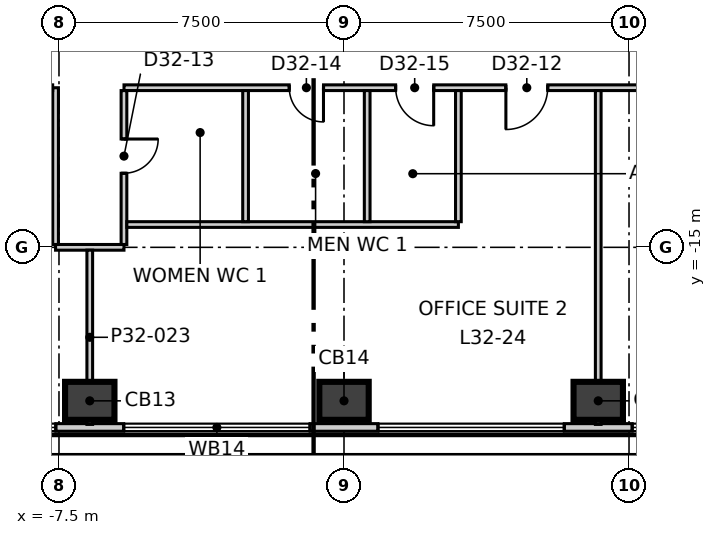
"""IFC4 building model, lengths in metres.
Left out: names, types, materials, properties, quantities, classifications, styles, units other than length and angle.
Written with IfcOpenShell. Run it as: python <this file> out.ifc"""

import sys

from ifc_helpers import new_model, si_unit, direction, frame, frame_2d, origin, origin_2d, place, context, subcontext, project, spatial, rectangle, extrude, element, fill, save


model = new_model("IFC4")
c1 = context("Model", 3, precision=1e-05, world=origin(), true_north=direction((0.0, 1.0)))
c2 = subcontext(c1, "Body", "Model", "MODEL_VIEW")
j1 = project(units=[si_unit("LENGTHUNIT", "METRE"), si_unit("PLANEANGLEUNIT", "RADIAN")], contexts=[c1])
p1 = place(None, origin())
s1 = spatial("IfcSite", under=j1, at=p1, CompositionType="ELEMENT")
p2 = place(p1, origin())
s2 = spatial("IfcBuilding", under=s1, at=p2, CompositionType="ELEMENT")
p3 = place(p2, frame((0.0, 0.0, 140.3)))
s3 = spatial("IfcBuildingStorey", under=s2, at=p3, CompositionType="ELEMENT", Elevation=140.3)
for number, where, z_axis, x_axis in (
    (1, (-6.69, -19.039, -0.3), (0.0, 0.0, 1.0), (1.0, 0.0, 0.0)),
    (2, (0.0, -19.039, -0.3), (0.0, 0.0, 1.0), (1.0, 0.0, 0.0)),
    (3, (6.69, -19.039, -0.3), (0.0, 0.0, 1.0), (1.0, 0.0, 0.0)),
):
    element("IfcColumn", number, at=place(p3, frame(where, z_axis=z_axis, x_axis=x_axis)), inside=s3, PredefinedType="COLUMN", context=c2, shape_type="SweptSolid", body=[
        extrude(rectangle(XDim=1.3, YDim=1.0, at=origin_2d()), origin(), (0.0, 0.0, 1.0), 4.0),
    ])
p4 = place(p3, frame((-3.063, 34.172, 0.0), z_axis=(0.0, 0.0, 1.0), x_axis=(-0.500008098571, -0.866020728022, 0.0)))
e4 = element("IfcWall", 4, at=p4, inside=s3, PredefinedType="ELEMENTEDWALL", context=c2, shape_type="SweptSolid", body=[
    extrude(rectangle(XDim=56.105, YDim=0.2, at=frame_2d((28.052, 0.0))), origin(), (0.0, 0.0, 1.0), 3.7),
])
p5 = place(p4, frame((2.197, 0.0, 0.9)))
e5 = element("IfcOpeningElement", 5, at=p5, cuts=e4, PredefinedType="OPENING", context=c2, shape_type="SweptSolid", body=[
    extrude(rectangle(XDim=4.9, YDim=2.5, at=frame_2d((2.45, 1.25))), frame((0.0, 0.11, 0.0), z_axis=(0.0, -1.0, 0.0), x_axis=(1.0, 0.0, 0.0)), (0.0, 0.0, 1.0), 0.22),
])
p6 = place(p4, frame((8.887, 0.0, 0.9)))
e6 = element("IfcOpeningElement", 6, at=p6, cuts=e4, PredefinedType="OPENING", context=c2, shape_type="SweptSolid", body=[
    extrude(rectangle(XDim=4.9, YDim=2.5, at=frame_2d((2.45, 1.25))), frame((0.0, 0.11, 0.0), z_axis=(0.0, -1.0, 0.0), x_axis=(1.0, 0.0, 0.0)), (0.0, 0.0, 1.0), 0.22),
])
p7 = place(p4, frame((15.577, 0.0, 0.9)))
e7 = element("IfcOpeningElement", 7, at=p7, cuts=e4, PredefinedType="OPENING", context=c2, shape_type="SweptSolid", body=[
    extrude(rectangle(XDim=4.9, YDim=2.5, at=frame_2d((2.45, 1.25))), frame((0.0, 0.11, 0.0), z_axis=(0.0, -1.0, 0.0), x_axis=(1.0, 0.0, 0.0)), (0.0, 0.0, 1.0), 0.22),
])
p8 = place(p4, frame((22.267, 0.0, 0.9)))
e8 = element("IfcOpeningElement", 8, at=p8, cuts=e4, PredefinedType="OPENING", context=c2, shape_type="SweptSolid", body=[
    extrude(rectangle(XDim=4.9, YDim=2.5, at=frame_2d((2.45, 1.25))), frame((0.0, 0.11, 0.0), z_axis=(0.0, -1.0, 0.0), x_axis=(1.0, 0.0, 0.0)), (0.0, 0.0, 1.0), 0.22),
])
p9 = place(p4, frame((28.957, 0.0, 0.9)))
e9 = element("IfcOpeningElement", 9, at=p9, cuts=e4, PredefinedType="OPENING", context=c2, shape_type="SweptSolid", body=[
    extrude(rectangle(XDim=4.9, YDim=2.5, at=frame_2d((2.45, 1.25))), frame((0.0, 0.11, 0.0), z_axis=(0.0, -1.0, 0.0), x_axis=(1.0, 0.0, 0.0)), (0.0, 0.0, 1.0), 0.22),
])
p10 = place(p4, frame((35.647, 0.0, 0.9)))
e10 = element("IfcOpeningElement", 10, at=p10, cuts=e4, PredefinedType="OPENING", context=c2, shape_type="SweptSolid", body=[
    extrude(rectangle(XDim=4.9, YDim=2.5, at=frame_2d((2.45, 1.25))), frame((0.0, 0.11, 0.0), z_axis=(0.0, -1.0, 0.0), x_axis=(1.0, 0.0, 0.0)), (0.0, 0.0, 1.0), 0.22),
])
p11 = place(p4, frame((42.337, 0.0, 0.9)))
e11 = element("IfcOpeningElement", 11, at=p11, cuts=e4, PredefinedType="OPENING", context=c2, shape_type="SweptSolid", body=[
    extrude(rectangle(XDim=4.9, YDim=2.5, at=frame_2d((2.45, 1.25))), frame((0.0, 0.11, 0.0), z_axis=(0.0, -1.0, 0.0), x_axis=(1.0, 0.0, 0.0)), (0.0, 0.0, 1.0), 0.22),
])
p12 = place(p4, frame((49.027, 0.0, 0.9)))
e12 = element("IfcOpeningElement", 12, at=p12, cuts=e4, PredefinedType="OPENING", context=c2, shape_type="SweptSolid", body=[
    extrude(rectangle(XDim=4.9, YDim=2.5, at=frame_2d((2.45, 1.25))), frame((0.0, 0.11, 0.0), z_axis=(0.0, -1.0, 0.0), x_axis=(1.0, 0.0, 0.0)), (0.0, 0.0, 1.0), 0.22),
])
p13 = place(p3, frame((-28.063, -19.739, 0.0), z_axis=(0.0, 0.0, 1.0), x_axis=(1.0, 0.0, 0.0)))
e13 = element("IfcWall", 13, at=p13, inside=s3, PredefinedType="ELEMENTEDWALL", context=c2, shape_type="SweptSolid", body=[
    extrude(rectangle(XDim=56.106, YDim=0.2, at=frame_2d((28.053, 0.0))), origin(), (0.0, 0.0, 1.0), 3.7),
])
p14 = place(p13, frame((2.198, 0.0, 0.9)))
e14 = element("IfcOpeningElement", 14, at=p14, cuts=e13, PredefinedType="OPENING", context=c2, shape_type="SweptSolid", body=[
    extrude(rectangle(XDim=4.9, YDim=2.5, at=frame_2d((2.45, 1.25))), frame((0.0, 0.11, 0.0), z_axis=(0.0, -1.0, 0.0), x_axis=(1.0, 0.0, 0.0)), (0.0, 0.0, 1.0), 0.22),
])
p15 = place(p13, frame((8.888, 0.0, 0.9)))
e15 = element("IfcOpeningElement", 15, at=p15, cuts=e13, PredefinedType="OPENING", context=c2, shape_type="SweptSolid", body=[
    extrude(rectangle(XDim=4.9, YDim=2.5, at=frame_2d((2.45, 1.25))), frame((0.0, 0.11, 0.0), z_axis=(0.0, -1.0, 0.0), x_axis=(1.0, 0.0, 0.0)), (0.0, 0.0, 1.0), 0.22),
])
p16 = place(p13, frame((15.578, 0.0, 0.9)))
e16 = element("IfcOpeningElement", 16, at=p16, cuts=e13, PredefinedType="OPENING", context=c2, shape_type="SweptSolid", body=[
    extrude(rectangle(XDim=4.9, YDim=2.5, at=frame_2d((2.45, 1.25))), frame((0.0, 0.11, 0.0), z_axis=(0.0, -1.0, 0.0), x_axis=(1.0, 0.0, 0.0)), (0.0, 0.0, 1.0), 0.22),
])
p17 = place(p13, frame((22.268, 0.0, 0.9)))
e17 = element("IfcOpeningElement", 17, at=p17, cuts=e13, PredefinedType="OPENING", context=c2, shape_type="SweptSolid", body=[
    extrude(rectangle(XDim=4.9, YDim=2.5, at=frame_2d((2.45, 1.25))), frame((0.0, 0.11, 0.0), z_axis=(0.0, -1.0, 0.0), x_axis=(1.0, 0.0, 0.0)), (0.0, 0.0, 1.0), 0.22),
])
p18 = place(p13, frame((28.958, 0.0, 0.9)))
e18 = element("IfcOpeningElement", 18, at=p18, cuts=e13, PredefinedType="OPENING", context=c2, shape_type="SweptSolid", body=[
    extrude(rectangle(XDim=4.9, YDim=2.5, at=frame_2d((2.45, 1.25))), frame((0.0, 0.11, 0.0), z_axis=(0.0, -1.0, 0.0), x_axis=(1.0, 0.0, 0.0)), (0.0, 0.0, 1.0), 0.22),
])
p19 = place(p13, frame((35.648, 0.0, 0.9)))
e19 = element("IfcOpeningElement", 19, at=p19, cuts=e13, PredefinedType="OPENING", context=c2, shape_type="SweptSolid", body=[
    extrude(rectangle(XDim=4.9, YDim=2.5, at=frame_2d((2.45, 1.25))), frame((0.0, 0.11, 0.0), z_axis=(0.0, -1.0, 0.0), x_axis=(1.0, 0.0, 0.0)), (0.0, 0.0, 1.0), 0.22),
])
p20 = place(p13, frame((42.338, 0.0, 0.9)))
e20 = element("IfcOpeningElement", 20, at=p20, cuts=e13, PredefinedType="OPENING", context=c2, shape_type="SweptSolid", body=[
    extrude(rectangle(XDim=4.9, YDim=2.5, at=frame_2d((2.45, 1.25))), frame((0.0, 0.11, 0.0), z_axis=(0.0, -1.0, 0.0), x_axis=(1.0, 0.0, 0.0)), (0.0, 0.0, 1.0), 0.22),
])
p21 = place(p13, frame((49.028, 0.0, 0.9)))
e21 = element("IfcOpeningElement", 21, at=p21, cuts=e13, PredefinedType="OPENING", context=c2, shape_type="SweptSolid", body=[
    extrude(rectangle(XDim=4.9, YDim=2.5, at=frame_2d((2.45, 1.25))), frame((0.0, 0.11, 0.0), z_axis=(0.0, -1.0, 0.0), x_axis=(1.0, 0.0, 0.0)), (0.0, 0.0, 1.0), 0.22),
])
p22 = place(p3, frame((31.126, -14.433, 0.0), z_axis=(0.0, 0.0, 1.0), x_axis=(-0.500008098571, 0.866020728022, 0.0)))
e22 = element("IfcWall", 22, at=p22, inside=s3, PredefinedType="ELEMENTEDWALL", context=c2, shape_type="SweptSolid", body=[
    extrude(rectangle(XDim=56.105, YDim=0.2, at=frame_2d((28.052, 0.0))), origin(), (0.0, 0.0, 1.0), 3.7),
])
p23 = place(p22, frame((2.198, 0.0, 0.9)))
e23 = element("IfcOpeningElement", 23, at=p23, cuts=e22, PredefinedType="OPENING", context=c2, shape_type="SweptSolid", body=[
    extrude(rectangle(XDim=4.9, YDim=2.5, at=frame_2d((2.45, 1.25))), frame((0.0, 0.11, 0.0), z_axis=(0.0, -1.0, 0.0), x_axis=(1.0, 0.0, 0.0)), (0.0, 0.0, 1.0), 0.22),
])
p24 = place(p22, frame((8.888, 0.0, 0.9)))
e24 = element("IfcOpeningElement", 24, at=p24, cuts=e22, PredefinedType="OPENING", context=c2, shape_type="SweptSolid", body=[
    extrude(rectangle(XDim=4.9, YDim=2.5, at=frame_2d((2.45, 1.25))), frame((0.0, 0.11, 0.0), z_axis=(0.0, -1.0, 0.0), x_axis=(1.0, 0.0, 0.0)), (0.0, 0.0, 1.0), 0.22),
])
p25 = place(p22, frame((15.578, 0.0, 0.9)))
e25 = element("IfcOpeningElement", 25, at=p25, cuts=e22, PredefinedType="OPENING", context=c2, shape_type="SweptSolid", body=[
    extrude(rectangle(XDim=4.9, YDim=2.5, at=frame_2d((2.45, 1.25))), frame((0.0, 0.11, 0.0), z_axis=(0.0, -1.0, 0.0), x_axis=(1.0, 0.0, 0.0)), (0.0, 0.0, 1.0), 0.22),
])
p26 = place(p22, frame((22.267, 0.0, 0.9)))
e26 = element("IfcOpeningElement", 26, at=p26, cuts=e22, PredefinedType="OPENING", context=c2, shape_type="SweptSolid", body=[
    extrude(rectangle(XDim=4.9, YDim=2.5, at=frame_2d((2.45, 1.25))), frame((0.0, 0.11, 0.0), z_axis=(0.0, -1.0, 0.0), x_axis=(1.0, 0.0, 0.0)), (0.0, 0.0, 1.0), 0.22),
])
p27 = place(p22, frame((28.957, 0.0, 0.9)))
e27 = element("IfcOpeningElement", 27, at=p27, cuts=e22, PredefinedType="OPENING", context=c2, shape_type="SweptSolid", body=[
    extrude(rectangle(XDim=4.9, YDim=2.5, at=frame_2d((2.45, 1.25))), frame((0.0, 0.11, 0.0), z_axis=(0.0, -1.0, 0.0), x_axis=(1.0, 0.0, 0.0)), (0.0, 0.0, 1.0), 0.22),
])
p28 = place(p22, frame((35.647, 0.0, 0.9)))
e28 = element("IfcOpeningElement", 28, at=p28, cuts=e22, PredefinedType="OPENING", context=c2, shape_type="SweptSolid", body=[
    extrude(rectangle(XDim=4.9, YDim=2.5, at=frame_2d((2.45, 1.25))), frame((0.0, 0.11, 0.0), z_axis=(0.0, -1.0, 0.0), x_axis=(1.0, 0.0, 0.0)), (0.0, 0.0, 1.0), 0.22),
])
p29 = place(p22, frame((42.337, 0.0, 0.9)))
e29 = element("IfcOpeningElement", 29, at=p29, cuts=e22, PredefinedType="OPENING", context=c2, shape_type="SweptSolid", body=[
    extrude(rectangle(XDim=4.9, YDim=2.5, at=frame_2d((2.45, 1.25))), frame((0.0, 0.11, 0.0), z_axis=(0.0, -1.0, 0.0), x_axis=(1.0, 0.0, 0.0)), (0.0, 0.0, 1.0), 0.22),
])
p30 = place(p22, frame((49.027, 0.0, 0.9)))
e30 = element("IfcOpeningElement", 30, at=p30, cuts=e22, PredefinedType="OPENING", context=c2, shape_type="SweptSolid", body=[
    extrude(rectangle(XDim=4.9, YDim=2.5, at=frame_2d((2.45, 1.25))), frame((0.0, 0.11, 0.0), z_axis=(0.0, -1.0, 0.0), x_axis=(1.0, 0.0, 0.0)), (0.0, 0.0, 1.0), 0.22),
])
p31 = place(p3, frame((-7.59, -15.0, 0.0), z_axis=(0.0, 0.0, 1.0), x_axis=(1.0, 0.0, 0.0)))
e31 = element("IfcWall", 31, at=p31, inside=s3, PredefinedType="PARTITIONING", context=c2, shape_type="SweptSolid", body=[
    extrude(rectangle(XDim=1.8, YDim=0.15, at=frame_2d((0.9, 0.0))), origin(), (0.0, 0.0, 1.0), 3.7),
])
p32 = place(p3, frame((-7.59, -14.925, 0.0), z_axis=(0.0, 0.0, 1.0), x_axis=(0.0, 1.0, 0.0)))
e32 = element("IfcWall", 32, at=p32, inside=s3, PredefinedType="PARTITIONING", context=c2, shape_type="SweptSolid", body=[
    extrude(rectangle(XDim=4.124, YDim=0.15, at=frame_2d((2.062, 0.0))), origin(), (0.0, 0.0, 1.0), 3.7),
])
p33 = place(p3, frame((-18.556, -10.8, 0.0), z_axis=(0.0, 0.0, 1.0), x_axis=(1.0, 0.0, 0.0)))
e33 = element("IfcWall", 33, at=p33, inside=s3, PredefinedType="PARTITIONING", context=c2, shape_type="SweptSolid", body=[
    extrude(rectangle(XDim=10.89, YDim=0.15, at=frame_2d((5.445, 0.0))), origin(), (0.0, 0.0, 1.0), 3.7),
])
p34 = place(p33, frame((4.9, 0.0, 0.0)))
e34 = element("IfcOpeningElement", 34, at=p34, cuts=e33, PredefinedType="OPENING", context=c2, shape_type="SweptSolid", body=[
    extrude(rectangle(XDim=1.1, YDim=2.1, at=frame_2d((0.55, 1.05))), frame((0.0, 0.085, 0.0), z_axis=(0.0, -1.0, 0.0), x_axis=(1.0, 0.0, 0.0)), (0.0, 0.0, 1.0), 0.17),
])
p35 = place(p3, frame((-5.789, -10.8, 0.0), z_axis=(0.0, 0.0, 1.0), x_axis=(1.0, 0.0, 0.0)))
e35 = element("IfcWall", 35, at=p35, inside=s3, PredefinedType="PARTITIONING", context=c2, shape_type="SweptSolid", body=[
    extrude(rectangle(XDim=24.495, YDim=0.15, at=frame_2d((12.248, 0.0))), origin(), (0.0, 0.0, 1.0), 3.7),
])
p36 = place(p35, frame((10.049, 0.0, 0.0)))
e36 = element("IfcOpeningElement", 36, at=p36, cuts=e35, PredefinedType="OPENING", context=c2, shape_type="SweptSolid", body=[
    extrude(rectangle(XDim=1.1, YDim=2.1, at=frame_2d((0.55, 1.05))), frame((0.0, 0.085, 0.0), z_axis=(0.0, -1.0, 0.0), x_axis=(1.0, 0.0, 0.0)), (0.0, 0.0, 1.0), 0.17),
])
p37 = place(p35, frame((4.349, 0.0, 0.0)))
e37 = element("IfcOpeningElement", 37, at=p37, cuts=e35, PredefinedType="OPENING", context=c2, shape_type="SweptSolid", body=[
    extrude(rectangle(XDim=0.9, YDim=2.1, at=frame_2d((0.45, 1.05))), frame((0.0, 0.085, 0.0), z_axis=(0.0, -1.0, 0.0), x_axis=(1.0, 0.0, 0.0)), (0.0, 0.0, 1.0), 0.17),
])
p38 = place(p35, frame((7.149, 0.0, 0.0)))
e38 = element("IfcOpeningElement", 38, at=p38, cuts=e35, PredefinedType="OPENING", context=c2, shape_type="SweptSolid", body=[
    extrude(rectangle(XDim=1.0, YDim=2.1, at=frame_2d((0.5, 1.05))), frame((0.0, 0.085, 0.0), z_axis=(0.0, -1.0, 0.0), x_axis=(1.0, 0.0, 0.0)), (0.0, 0.0, 1.0), 0.17),
])
p39 = place(p35, frame((17.929, 0.0, 0.0)))
e39 = element("IfcOpeningElement", 39, at=p39, cuts=e35, PredefinedType="OPENING", context=c2, shape_type="SweptSolid", body=[
    extrude(rectangle(XDim=1.1, YDim=2.1, at=frame_2d((0.55, 1.05))), frame((0.0, 0.085, 0.0), z_axis=(0.0, -1.0, 0.0), x_axis=(1.0, 0.0, 0.0)), (0.0, 0.0, 1.0), 0.17),
])
p40 = place(p3, frame((-6.69, -19.659, 0.0), z_axis=(0.0, 0.0, 1.0), x_axis=(0.0, 1.0, 0.0)))
e40 = element("IfcWall", 40, at=p40, inside=s3, PredefinedType="PARTITIONING", context=c2, shape_type="SweptSolid", body=[
    extrude(rectangle(XDim=4.584, YDim=0.15, at=frame_2d((2.292, 0.0))), origin(), (0.0, 0.0, 1.0), 3.7),
])
p41 = place(p3, frame((-5.79, -14.925, 0.0), z_axis=(0.0, 0.0, 1.0), x_axis=(0.0, 1.0, 0.0)))
e41 = element("IfcWall", 41, at=p41, inside=s3, PredefinedType="PARTITIONING", context=c2, shape_type="SweptSolid", body=[
    extrude(rectangle(XDim=4.049, YDim=0.15, at=frame_2d((2.024, 0.0))), origin(), (0.0, 0.0, 1.0), 3.7),
])
p42 = place(p41, frame((1.875, 0.0, 0.0)))
e42 = element("IfcOpeningElement", 42, at=p42, cuts=e41, PredefinedType="OPENING", context=c2, shape_type="SweptSolid", body=[
    extrude(rectangle(XDim=0.9, YDim=2.1, at=frame_2d((0.45, 1.05))), frame((0.0, 0.085, 0.0), z_axis=(0.0, -1.0, 0.0), x_axis=(1.0, 0.0, 0.0)), (0.0, 0.0, 1.0), 0.17),
])
p43 = place(p3, frame((-5.715, -14.4, 0.0), z_axis=(0.0, 0.0, 1.0), x_axis=(1.0, 0.0, 0.0)))
e43 = element("IfcWall", 43, at=p43, inside=s3, PredefinedType="PARTITIONING", context=c2, shape_type="SweptSolid", body=[
    extrude(rectangle(XDim=8.725, YDim=0.15, at=frame_2d((4.363, 0.0))), origin(), (0.0, 0.0, 1.0), 3.7),
])
for number, where, z_axis, x_axis in (
    (44, (-2.59, -14.325, 0.0), (0.0, 0.0, 1.0), (0.0, 1.0, 0.0)),
    (45, (3.01, -14.325, 0.0), (0.0, 0.0, 1.0), (0.0, 1.0, 0.0)),
    (46, (0.61, -14.325, 0.0), (0.0, 0.0, 1.0), (0.0, 1.0, 0.0)),
):
    element("IfcWall", number, at=place(p3, frame(where, z_axis=z_axis, x_axis=x_axis)), inside=s3, PredefinedType="PARTITIONING", context=c2, shape_type="SweptSolid", body=[
        extrude(rectangle(XDim=3.45, YDim=0.15, at=frame_2d((1.725, 0.0))), origin(), (0.0, 0.0, 1.0), 3.7),
    ])
p44 = place(p3, frame((6.69, -19.659, 0.0), z_axis=(0.0, 0.0, 1.0), x_axis=(0.0, 1.0, 0.0)))
e47 = element("IfcWall", 47, at=p44, inside=s3, PredefinedType="PARTITIONING", context=c2, shape_type="SweptSolid", body=[
    extrude(rectangle(XDim=8.784, YDim=0.15, at=frame_2d((4.392, 0.0))), origin(), (0.0, 0.0, 1.0), 3.7),
])
p45 = place(p16, origin())
e48 = element("IfcWindow", 48, at=p45, inside=s3, PartitioningType="SINGLE_PANEL", PredefinedType="WINDOW", context=c2, shape_type="SweptSolid", body=[
    extrude(rectangle(XDim=4.9, YDim=2.5, at=frame_2d((2.45, 1.25))), frame((0.0, 0.03, 0.0), z_axis=(0.0, -1.0, 0.0), x_axis=(1.0, 0.0, 0.0)), (0.0, 0.0, 1.0), 0.06),
])
fill(e16, e48)
p46 = place(p17, origin())
e49 = element("IfcWindow", 49, at=p46, inside=s3, PartitioningType="SINGLE_PANEL", PredefinedType="WINDOW", context=c2, shape_type="SweptSolid", body=[
    extrude(rectangle(XDim=4.9, YDim=2.5, at=frame_2d((2.45, 1.25))), frame((0.0, 0.03, 0.0), z_axis=(0.0, -1.0, 0.0), x_axis=(1.0, 0.0, 0.0)), (0.0, 0.0, 1.0), 0.06),
])
fill(e17, e49)
p47 = place(p18, origin())
e50 = element("IfcWindow", 50, at=p47, inside=s3, PartitioningType="SINGLE_PANEL", PredefinedType="WINDOW", context=c2, shape_type="SweptSolid", body=[
    extrude(rectangle(XDim=4.9, YDim=2.5, at=frame_2d((2.45, 1.25))), frame((0.0, 0.03, 0.0), z_axis=(0.0, -1.0, 0.0), x_axis=(1.0, 0.0, 0.0)), (0.0, 0.0, 1.0), 0.06),
])
fill(e18, e50)
p48 = place(p19, origin())
e51 = element("IfcWindow", 51, at=p48, inside=s3, PartitioningType="SINGLE_PANEL", PredefinedType="WINDOW", context=c2, shape_type="SweptSolid", body=[
    extrude(rectangle(XDim=4.9, YDim=2.5, at=frame_2d((2.45, 1.25))), frame((0.0, 0.03, 0.0), z_axis=(0.0, -1.0, 0.0), x_axis=(1.0, 0.0, 0.0)), (0.0, 0.0, 1.0), 0.06),
])
fill(e19, e51)
p49 = place(p36, origin())
e52 = element("IfcDoor", 52, at=p49, inside=s3, OperationType="SINGLE_SWING_LEFT", PredefinedType="DOOR", context=c2, shape_type="SweptSolid", body=[
    extrude(rectangle(XDim=1.1, YDim=2.1, at=frame_2d((0.55, 1.05))), frame((0.0, 0.025, 0.0), z_axis=(0.0, -1.0, 0.0), x_axis=(1.0, 0.0, 0.0)), (0.0, 0.0, 1.0), 0.05),
])
fill(e36, e52)
p50 = place(p42, origin())
e53 = element("IfcDoor", 53, at=p50, inside=s3, OperationType="SINGLE_SWING_RIGHT", PredefinedType="DOOR", context=c2, shape_type="SweptSolid", body=[
    extrude(rectangle(XDim=0.9, YDim=2.1, at=frame_2d((0.45, 1.05))), frame((0.0, 0.025, 0.0), z_axis=(0.0, -1.0, 0.0), x_axis=(1.0, 0.0, 0.0)), (0.0, 0.0, 1.0), 0.05),
])
fill(e42, e53)
p51 = place(p37, origin())
e54 = element("IfcDoor", 54, at=p51, inside=s3, OperationType="SINGLE_SWING_RIGHT", PredefinedType="DOOR", context=c2, shape_type="SweptSolid", body=[
    extrude(rectangle(XDim=0.9, YDim=2.1, at=frame_2d((0.45, 1.05))), frame((0.0, 0.025, 0.0), z_axis=(0.0, -1.0, 0.0), x_axis=(1.0, 0.0, 0.0)), (0.0, 0.0, 1.0), 0.05),
])
fill(e37, e54)
p52 = place(p38, origin())
e55 = element("IfcDoor", 55, at=p52, inside=s3, OperationType="SINGLE_SWING_RIGHT", PredefinedType="DOOR", context=c2, shape_type="SweptSolid", body=[
    extrude(rectangle(XDim=1.0, YDim=2.1, at=frame_2d((0.5, 1.05))), frame((0.0, 0.025, 0.0), z_axis=(0.0, -1.0, 0.0), x_axis=(1.0, 0.0, 0.0)), (0.0, 0.0, 1.0), 0.05),
])
fill(e38, e55)
save(model, sys.argv[1])
